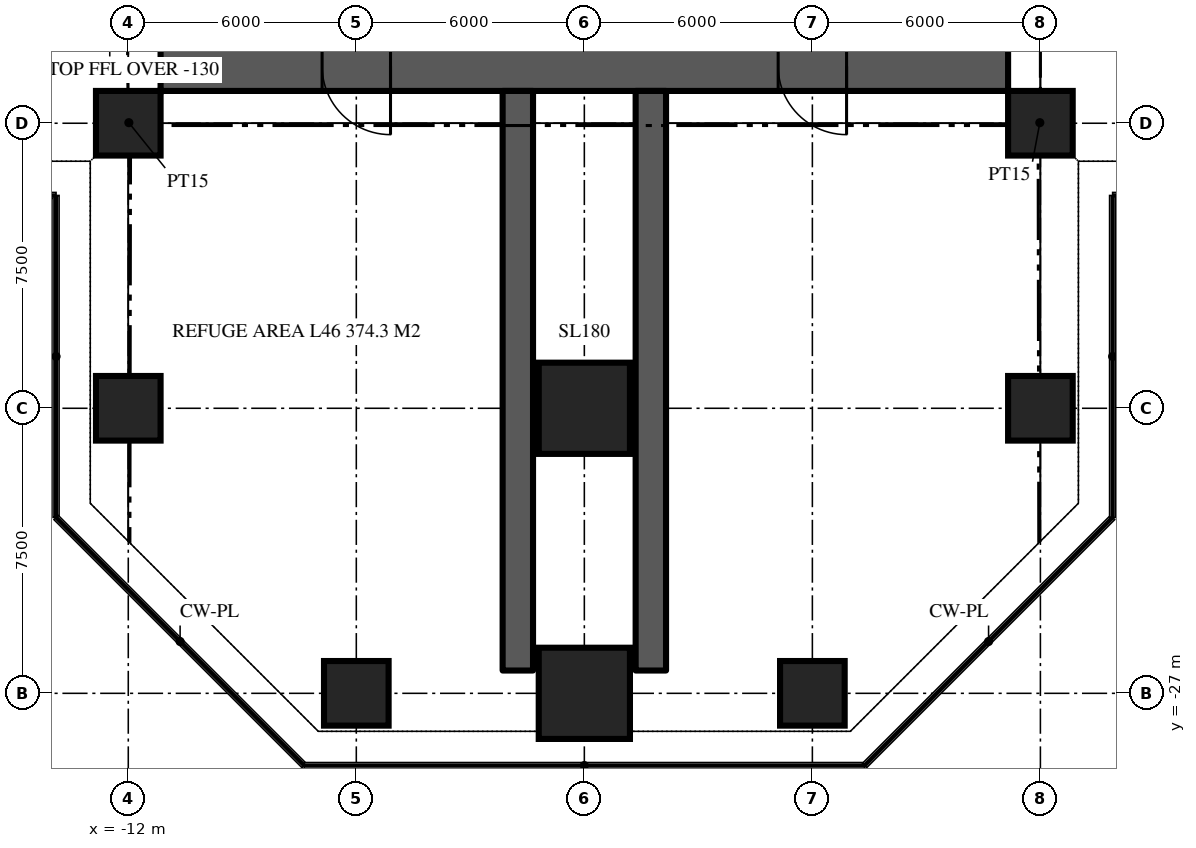
"""IFC4 building model, lengths in metres.
Left out: names, types, materials, properties, quantities, classifications, styles, units other than length and angle.
Written with IfcOpenShell. Run it as: python <this file> out.ifc"""

import sys

from ifc_helpers import new_model, si_unit, direction, frame, frame_2d, origin, origin_2d, place, context, subcontext, project, spatial, rectangle, extrude, element, fill, save


model = new_model("IFC4")
c1 = context("Model", 3, precision=1e-05, world=origin(), true_north=direction((0.0, 1.0)))
c2 = subcontext(c1, "Body", "Model", "MODEL_VIEW")
j1 = project(units=[si_unit("LENGTHUNIT", "METRE"), si_unit("PLANEANGLEUNIT", "RADIAN")], contexts=[c1])
p1 = place(None, origin())
s1 = spatial("IfcSite", under=j1, at=p1, CompositionType="ELEMENT")
p2 = place(p1, origin())
s2 = spatial("IfcBuilding", under=s1, at=p2, CompositionType="ELEMENT")
p3 = place(p2, frame((0.0, 0.0, 198.9)))
s3 = spatial("IfcBuildingStorey", under=s2, at=p3, CompositionType="ELEMENT", Elevation=198.9)
p4 = place(p3, frame((11.15, -10.5, 0.0), z_axis=(0.0, 0.0, 1.0), x_axis=(-1.0, 0.0, 0.0)))
e1 = element("IfcWall", 1, at=p4, inside=s3, PredefinedType="SHEAR", context=c2, shape_type="SweptSolid", body=[
    extrude(rectangle(XDim=22.3, YDim=1.3, at=frame_2d((11.15, 0.0))), origin(), (0.0, 0.0, 1.0), 6.0),
])
p5 = place(p4, frame((16.25, 0.0, 0.0)))
e2 = element("IfcOpeningElement", 2, at=p5, cuts=e1, PredefinedType="OPENING", context=c2, shape_type="SweptSolid", body=[
    extrude(rectangle(XDim=1.8, YDim=2.2, at=frame_2d((0.9, 1.1))), frame((0.0, 0.66, 0.0), z_axis=(0.0, -1.0, 0.0), x_axis=(1.0, 0.0, 0.0)), (0.0, 0.0, 1.0), 1.32),
])
p6 = place(p4, frame((4.25, 0.0, 0.0)))
e3 = element("IfcOpeningElement", 3, at=p6, cuts=e1, PredefinedType="OPENING", context=c2, shape_type="SweptSolid", body=[
    extrude(rectangle(XDim=1.8, YDim=2.2, at=frame_2d((0.9, 1.1))), frame((0.0, 0.66, 0.0), z_axis=(0.0, -1.0, 0.0), x_axis=(1.0, 0.0, 0.0)), (0.0, 0.0, 1.0), 1.32),
])
for number, where, z_axis, x_axis in (
    (4, (-1.75, -11.15, 0.0), (0.0, 0.0, 1.0), (0.0, -1.0, 0.0)),
    (5, (1.75, -11.15, 0.0), (0.0, 0.0, 1.0), (0.0, -1.0, 0.0)),
):
    element("IfcWall", number, at=place(p3, frame(where, z_axis=z_axis, x_axis=x_axis)), inside=s3, PredefinedType="SHEAR", context=c2, shape_type="SweptSolid", body=[
        extrude(rectangle(XDim=15.25, YDim=0.8, at=frame_2d((7.625, 0.0))), origin(), (0.0, 0.0, 1.0), 6.0),
    ])
p7 = place(p3, frame((-6.0, -27.0, 0.0), z_axis=(0.0, 0.0, 1.0), x_axis=(1.0, 0.0, 0.0)))
e6 = element("IfcColumn", 6, at=p7, inside=s3, PredefinedType="COLUMN", context=c2, shape_type="SweptSolid", body=[
    extrude(rectangle(XDim=1.7, YDim=1.7, at=origin_2d()), origin(), (0.0, 0.0, 1.0), 6.0),
])
p8 = place(p3, frame((0.0, -27.0, 0.0), z_axis=(0.0, 0.0, 1.0), x_axis=(1.0, 0.0, 0.0)))
e7 = element("IfcColumn", 7, at=p8, inside=s3, PredefinedType="COLUMN", context=c2, shape_type="SweptSolid", body=[
    extrude(rectangle(XDim=2.4, YDim=2.4, at=origin_2d()), origin(), (0.0, 0.0, 1.0), 6.0),
])
for number, where, z_axis, x_axis in (
    (8, (6.0, -27.0, 0.0), (0.0, 0.0, 1.0), (1.0, 0.0, 0.0)),
    (9, (-12.0, -19.5, 0.0), (0.0, 0.0, 1.0), (1.0, 0.0, 0.0)),
):
    element("IfcColumn", number, at=place(p3, frame(where, z_axis=z_axis, x_axis=x_axis)), inside=s3, PredefinedType="COLUMN", context=c2, shape_type="SweptSolid", body=[
        extrude(rectangle(XDim=1.7, YDim=1.7, at=origin_2d()), origin(), (0.0, 0.0, 1.0), 6.0),
    ])
p9 = place(p3, frame((0.0, -19.5, 0.0), z_axis=(0.0, 0.0, 1.0), x_axis=(1.0, 0.0, 0.0)))
e10 = element("IfcColumn", 10, at=p9, inside=s3, PredefinedType="COLUMN", context=c2, shape_type="SweptSolid", body=[
    extrude(rectangle(XDim=2.4, YDim=2.4, at=origin_2d()), origin(), (0.0, 0.0, 1.0), 6.0),
])
for number, where, z_axis, x_axis in (
    (11, (12.0, -19.5, 0.0), (0.0, 0.0, 1.0), (1.0, 0.0, 0.0)),
    (12, (-12.0, -12.0, 0.0), (0.0, 0.0, 1.0), (1.0, 0.0, 0.0)),
    (13, (12.0, -12.0, 0.0), (0.0, 0.0, 1.0), (1.0, 0.0, 0.0)),
):
    element("IfcColumn", number, at=place(p3, frame(where, z_axis=z_axis, x_axis=x_axis)), inside=s3, PredefinedType="COLUMN", context=c2, shape_type="SweptSolid", body=[
        extrude(rectangle(XDim=1.7, YDim=1.7, at=origin_2d()), origin(), (0.0, 0.0, 1.0), 6.0),
    ])
for number, where, z_axis, x_axis in (
    (14, (-11.15, -11.15, 0.0), (0.0, 0.0, 1.0), (-0.707, -0.707, 0.0)),
    (15, (11.15, -11.15, 0.0), (0.0, 0.0, 1.0), (0.707, -0.707, 0.0)),
):
    element("IfcWall", number, at=place(p3, frame(where, z_axis=z_axis, x_axis=x_axis)), inside=s3, PredefinedType="PARTITIONING", context=c2, shape_type="SweptSolid", body=[
        extrude(rectangle(XDim=2.362, YDim=0.15, at=frame_2d((1.181, 0.0))), origin(), (0.0, 0.0, 1.0), 5.32),
    ])
p10 = place(p5, origin())
e16 = element("IfcDoor", 16, at=p10, inside=s3, OperationType="DOUBLE_DOOR_DOUBLE_SWING", PredefinedType="DOOR", context=c2, shape_type="SweptSolid", body=[
    extrude(rectangle(XDim=1.8, YDim=2.2, at=frame_2d((0.9, 1.1))), frame((0.0, 0.025, 0.0), z_axis=(0.0, -1.0, 0.0), x_axis=(1.0, 0.0, 0.0)), (0.0, 0.0, 1.0), 0.05),
])
fill(e2, e16)
p11 = place(p6, origin())
e17 = element("IfcDoor", 17, at=p11, inside=s3, OperationType="DOUBLE_DOOR_DOUBLE_SWING", PredefinedType="DOOR", context=c2, shape_type="SweptSolid", body=[
    extrude(rectangle(XDim=1.8, YDim=2.2, at=frame_2d((0.9, 1.1))), frame((0.0, 0.025, 0.0), z_axis=(0.0, -1.0, 0.0), x_axis=(1.0, 0.0, 0.0)), (0.0, 0.0, 1.0), 0.05),
])
fill(e3, e17)
save(model, sys.argv[1])
